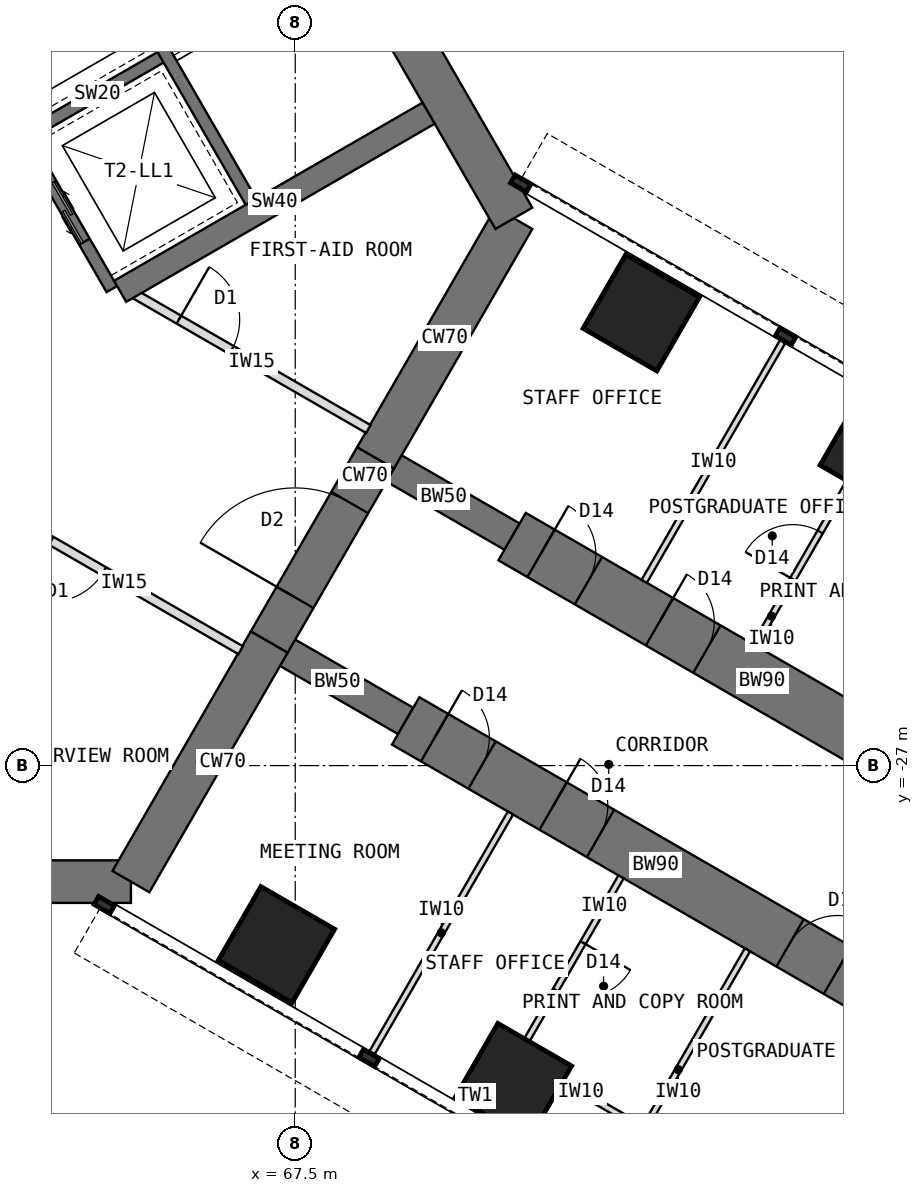
"""IFC4 building model, lengths in metres.
Left out: names, types, materials, properties, quantities, classifications, styles, units other than length and angle.
Written with IfcOpenShell. Run it as: python <this file> out.ifc"""

import sys

from ifc_helpers import new_model, si_unit, direction, frame, frame_2d, origin, origin_2d, place, context, subcontext, project, spatial, rectangle, extrude, element, fill, save


model = new_model("IFC4")
c1 = context("Model", 3, precision=1e-05, world=origin(), true_north=direction((0.0, 1.0)))
c2 = subcontext(c1, "Body", "Model", "MODEL_VIEW")
j1 = project(units=[si_unit("LENGTHUNIT", "METRE"), si_unit("PLANEANGLEUNIT", "RADIAN")], contexts=[c1])
p1 = place(None, origin())
s1 = spatial("IfcSite", under=j1, at=p1, CompositionType="ELEMENT")
p2 = place(p1, origin())
s2 = spatial("IfcBuilding", under=s1, at=p2, CompositionType="ELEMENT")
p3 = place(p2, frame((0.0, 0.0, 84.5)))
s3 = spatial("IfcBuildingStorey", under=s2, at=p3, CompositionType="ELEMENT", Elevation=84.5)
p4 = place(p3, frame((52.202, -28.908, 0.0), z_axis=(0.0, 0.0, 1.0), x_axis=(1.0, 0.0, 0.0)))
e1 = element("IfcWall", 1, at=p4, inside=s3, PredefinedType="SHEAR", context=c2, shape_type="SweptSolid", body=[
    extrude(rectangle(XDim=12.596, YDim=0.7, at=frame_2d((6.298, 0.0))), origin(), (0.0, 0.0, 1.0), 4.0),
])
p5 = place(p3, frame((64.798, -28.908, 0.0), z_axis=(0.0, 0.0, 1.0), x_axis=(0.499984222037, 0.866034513004, 0.0)))
e2 = element("IfcWall", 2, at=p5, inside=s3, PredefinedType="SHEAR", context=c2, shape_type="SweptSolid", body=[
    extrude(rectangle(XDim=4.548, YDim=0.7, at=frame_2d((2.274, 0.0))), origin(), (0.0, 0.0, 1.0), 4.0),
])
p6 = place(p3, frame((67.072, -24.97, 0.0), z_axis=(0.0, 0.0, 1.0), x_axis=(0.500010275428, 0.866019471182, 0.0)))
e3 = element("IfcWall", 3, at=p6, inside=s3, PredefinedType="SHEAR", context=c2, shape_type="SweptSolid", body=[
    extrude(rectangle(XDim=3.5, YDim=0.7, at=frame_2d((1.75, 0.0))), origin(), (0.0, 0.0, 1.0), 4.0),
])
p7 = place(p6, frame((0.85, 0.0, 0.0)))
e4 = element("IfcOpeningElement", 4, at=p7, cuts=e3, PredefinedType="OPENING", context=c2, shape_type="SweptSolid", body=[
    extrude(rectangle(XDim=1.8, YDim=2.1, at=frame_2d((0.9, 1.05))), frame((0.0, 0.36, 0.0), z_axis=(0.0, -1.0, 0.0), x_axis=(1.0, 0.0, 0.0)), (0.0, 0.0, 1.0), 0.72),
])
p8 = place(p3, frame((68.822, -21.939, 0.0), z_axis=(0.0, 0.0, 1.0), x_axis=(0.500024481964, 0.866011268655, 0.0)))
e5 = element("IfcWall", 5, at=p8, inside=s3, PredefinedType="SHEAR", context=c2, shape_type="SweptSolid", body=[
    extrude(rectangle(XDim=4.548, YDim=0.7, at=frame_2d((2.274, 0.0))), origin(), (0.0, 0.0, 1.0), 4.0),
])
p9 = place(p3, frame((71.096, -18.0, 0.0), z_axis=(0.0, 0.0, 1.0), x_axis=(-0.500005998175, 0.866021940709, 0.0)))
e6 = element("IfcWall", 6, at=p9, inside=s3, PredefinedType="SHEAR", context=c2, shape_type="SweptSolid", body=[
    extrude(rectangle(XDim=12.596, YDim=0.7, at=frame_2d((6.298, 0.0))), origin(), (0.0, 0.0, 1.0), 4.0),
])
p10 = place(p3, frame((68.822, -21.939, 0.0), z_axis=(0.0, 0.0, 1.0), x_axis=(0.866072649678, -0.499918158782, 0.0)))
e7 = element("IfcWall", 7, at=p10, inside=s3, PredefinedType="SHEAR", context=c2, shape_type="SweptSolid", body=[
    extrude(rectangle(XDim=2.592, YDim=0.5, at=frame_2d((1.296, 0.0))), origin(), (0.0, 0.0, 1.0), 4.0),
])
p11 = place(p3, frame((71.066, -23.234, 0.0), z_axis=(0.0, 0.0, 1.0), x_axis=(0.86602681393, -0.499997557548, 0.0)))
e8 = element("IfcWall", 8, at=p11, inside=s3, PredefinedType="SHEAR", context=c2, shape_type="SweptSolid", body=[
    extrude(rectangle(XDim=9.5, YDim=0.9, at=frame_2d((4.75, 0.0))), origin(), (0.0, 0.0, 1.0), 4.0),
])
p12 = place(p11, frame((0.55, 0.0, 0.0)))
e9 = element("IfcOpeningElement", 9, at=p12, cuts=e8, PredefinedType="OPENING", context=c2, shape_type="SweptSolid", body=[
    extrude(rectangle(XDim=0.9, YDim=2.1, at=frame_2d((0.45, 1.05))), frame((0.0, 0.46, 0.0), z_axis=(0.0, -1.0, 0.0), x_axis=(1.0, 0.0, 0.0)), (0.0, 0.0, 1.0), 0.92),
])
p13 = place(p11, frame((2.8, 0.0, 0.0)))
e10 = element("IfcOpeningElement", 10, at=p13, cuts=e8, PredefinedType="OPENING", context=c2, shape_type="SweptSolid", body=[
    extrude(rectangle(XDim=0.9, YDim=2.1, at=frame_2d((0.45, 1.05))), frame((0.0, 0.46, 0.0), z_axis=(0.0, -1.0, 0.0), x_axis=(1.0, 0.0, 0.0)), (0.0, 0.0, 1.0), 0.92),
])
p14 = place(p11, frame((7.3, 0.0, 0.0)))
e11 = element("IfcOpeningElement", 11, at=p14, cuts=e8, PredefinedType="OPENING", context=c2, shape_type="SweptSolid", body=[
    extrude(rectangle(XDim=0.9, YDim=2.1, at=frame_2d((0.45, 1.05))), frame((0.0, 0.46, 0.0), z_axis=(0.0, -1.0, 0.0), x_axis=(1.0, 0.0, 0.0)), (0.0, 0.0, 1.0), 0.92),
])
p15 = place(p3, frame((67.072, -24.97, 0.0), z_axis=(0.0, 0.0, 1.0), x_axis=(0.866031863473, -0.499988811324, 0.0)))
e12 = element("IfcWall", 12, at=p15, inside=s3, PredefinedType="SHEAR", context=c2, shape_type="SweptSolid", body=[
    extrude(rectangle(XDim=2.592, YDim=0.5, at=frame_2d((1.296, 0.0))), origin(), (0.0, 0.0, 1.0), 4.0),
])
p16 = place(p3, frame((69.316, -26.266, 0.0), z_axis=(0.0, 0.0, 1.0), x_axis=(0.86602681393, -0.499997557548, 0.0)))
e13 = element("IfcWall", 13, at=p16, inside=s3, PredefinedType="SHEAR", context=c2, shape_type="SweptSolid", body=[
    extrude(rectangle(XDim=9.5, YDim=0.9, at=frame_2d((4.75, 0.0))), origin(), (0.0, 0.0, 1.0), 4.0),
])
p17 = place(p16, frame((0.55, 0.0, 0.0)))
e14 = element("IfcOpeningElement", 14, at=p17, cuts=e13, PredefinedType="OPENING", context=c2, shape_type="SweptSolid", body=[
    extrude(rectangle(XDim=0.9, YDim=2.1, at=frame_2d((0.45, 1.05))), frame((0.0, 0.46, 0.0), z_axis=(0.0, -1.0, 0.0), x_axis=(1.0, 0.0, 0.0)), (0.0, 0.0, 1.0), 0.92),
])
p18 = place(p16, frame((2.8, 0.0, 0.0)))
e15 = element("IfcOpeningElement", 15, at=p18, cuts=e13, PredefinedType="OPENING", context=c2, shape_type="SweptSolid", body=[
    extrude(rectangle(XDim=0.9, YDim=2.1, at=frame_2d((0.45, 1.05))), frame((0.0, 0.46, 0.0), z_axis=(0.0, -1.0, 0.0), x_axis=(1.0, 0.0, 0.0)), (0.0, 0.0, 1.0), 0.92),
])
p19 = place(p16, frame((7.3, 0.0, 0.0)))
e16 = element("IfcOpeningElement", 16, at=p19, cuts=e13, PredefinedType="OPENING", context=c2, shape_type="SweptSolid", body=[
    extrude(rectangle(XDim=0.9, YDim=2.1, at=frame_2d((0.45, 1.05))), frame((0.0, 0.46, 0.0), z_axis=(0.0, -1.0, 0.0), x_axis=(1.0, 0.0, 0.0)), (0.0, 0.0, 1.0), 0.92),
])
for number, where, z_axis, x_axis in (
    (17, (73.191, -19.554, 0.0), (0.0, 0.0, 1.0), (0.5, 0.866, 0.0)),
    (18, (67.191, -29.946, 0.0), (0.0, 0.0, 1.0), (0.5, 0.866, 0.0)),
    (19, (77.088, -21.804, 0.0), (0.0, 0.0, 1.0), (0.5, 0.866, 0.0)),
    (20, (71.088, -32.196, 0.0), (0.0, 0.0, 1.0), (0.5, 0.866, 0.0)),
):
    element("IfcColumn", number, at=place(p3, frame(where, z_axis=z_axis, x_axis=x_axis)), inside=s3, PredefinedType="COLUMN", context=c2, shape_type="SweptSolid", body=[
        extrude(rectangle(XDim=1.4, YDim=1.4, at=origin_2d()), origin(), (0.0, 0.0, 1.0), 4.0),
    ])
p20 = place(p3, frame((64.484, -19.164, 0.0), z_axis=(0.0, 0.0, 1.0), x_axis=(-0.49999894854, 0.866026010844, 0.0)))
e21 = element("IfcWall", 21, at=p20, inside=s3, PredefinedType="SHEAR", context=c2, shape_type="SweptSolid", body=[
    extrude(rectangle(XDim=8.0, YDim=0.2, at=frame_2d((4.0, 0.0))), origin(), (0.0, 0.0, 1.0), 4.0),
])
p21 = place(p20, frame((6.3, 0.0, 0.0)))
e22 = element("IfcOpeningElement", 22, at=p21, cuts=e21, PredefinedType="OPENING", context=c2, shape_type="SweptSolid", body=[
    extrude(rectangle(XDim=1.2, YDim=2.1, at=frame_2d((0.6, 1.05))), frame((0.0, 0.11, 0.0), z_axis=(0.0, -1.0, 0.0), x_axis=(1.0, 0.0, 0.0)), (0.0, 0.0, 1.0), 0.22),
])
p22 = place(p20, frame((0.9, 0.0, 0.0)))
e23 = element("IfcOpeningElement", 23, at=p22, cuts=e21, PredefinedType="OPENING", context=c2, shape_type="SweptSolid", body=[
    extrude(rectangle(XDim=1.1, YDim=2.2, at=frame_2d((0.55, 1.1))), frame((0.0, 0.11, 0.0), z_axis=(0.0, -1.0, 0.0), x_axis=(1.0, 0.0, 0.0)), (0.0, 0.0, 1.0), 0.22),
])
p23 = place(p20, frame((3.8, 0.0, 0.0)))
e24 = element("IfcOpeningElement", 24, at=p23, cuts=e21, PredefinedType="OPENING", context=c2, shape_type="SweptSolid", body=[
    extrude(rectangle(XDim=1.1, YDim=2.2, at=frame_2d((0.55, 1.1))), frame((0.0, 0.11, 0.0), z_axis=(0.0, -1.0, 0.0), x_axis=(1.0, 0.0, 0.0)), (0.0, 0.0, 1.0), 0.22),
])
p24 = place(p3, frame((63.12, -16.603, 0.0), z_axis=(0.0, 0.0, 1.0), x_axis=(0.866062058628, 0.499936506574, 0.0)))
e25 = element("IfcWall", 25, at=p24, inside=s3, PredefinedType="SHEAR", context=c2, shape_type="SweptSolid", body=[
    extrude(rectangle(XDim=2.6, YDim=0.2, at=frame_2d((1.3, 0.0))), origin(), (0.0, 0.0, 1.0), 4.0),
])
p25 = place(p3, frame((66.822, -17.814, 0.0), z_axis=(0.0, 0.0, 1.0), x_axis=(-0.49999894854, 0.866026010844, 0.0)))
e26 = element("IfcWall", 26, at=p25, inside=s3, PredefinedType="SHEAR", context=c2, shape_type="SweptSolid", body=[
    extrude(rectangle(XDim=8.0, YDim=0.2, at=frame_2d((4.0, 0.0))), origin(), (0.0, 0.0, 1.0), 4.0),
])
p26 = place(p25, frame((6.7, 0.0, 0.0)))
e27 = element("IfcOpeningElement", 27, at=p26, cuts=e26, PredefinedType="OPENING", context=c2, shape_type="SweptSolid", body=[
    extrude(rectangle(XDim=1.1, YDim=2.1, at=frame_2d((0.55, 1.05))), frame((0.0, 0.11, 0.0), z_axis=(0.0, -1.0, 0.0), x_axis=(1.0, 0.0, 0.0)), (0.0, 0.0, 1.0), 0.22),
])
p27 = place(p3, frame((64.62, -19.201, 0.0), z_axis=(0.0, 0.0, 1.0), x_axis=(0.866023886965, 0.500002627198, 0.0)))
e28 = element("IfcWall", 28, at=p27, inside=s3, PredefinedType="SHEAR", context=c2, shape_type="SweptSolid", body=[
    extrude(rectangle(XDim=5.858, YDim=0.4, at=frame_2d((2.929, 0.0))), origin(), (0.0, 0.0, 1.0), 4.0),
])
p28 = place(p3, frame((73.24, -23.97, 0.0), z_axis=(0.0, 0.0, 1.0), x_axis=(0.499982560684, 0.866035472144, 0.0)))
e29 = element("IfcWall", 29, at=p28, inside=s3, PredefinedType="PARTITIONING", context=c2, shape_type="SweptSolid", body=[
    extrude(rectangle(XDim=4.55, YDim=0.1, at=frame_2d((2.275, 0.0))), origin(), (0.0, 0.0, 1.0), 3.8),
])
p29 = place(p3, frame((75.059, -25.02, 0.0), z_axis=(0.0, 0.0, 1.0), x_axis=(0.499977295307, 0.866038511948, 0.0)))
e30 = element("IfcWall", 30, at=p29, inside=s3, PredefinedType="PARTITIONING", context=c2, shape_type="SweptSolid", body=[
    extrude(rectangle(XDim=3.4, YDim=0.1, at=frame_2d((1.7, 0.0))), origin(), (0.0, 0.0, 1.0), 3.8),
])
p30 = place(p29, frame((1.25, 0.0, 0.0)))
e31 = element("IfcOpeningElement", 31, at=p30, cuts=e30, PredefinedType="OPENING", context=c2, shape_type="SweptSolid", body=[
    extrude(rectangle(XDim=0.9, YDim=2.1, at=frame_2d((0.45, 1.05))), frame((0.0, 0.06, 0.0), z_axis=(0.0, -1.0, 0.0), x_axis=(1.0, 0.0, 0.0)), (0.0, 0.0, 1.0), 0.12),
])
for number, where, z_axis, x_axis in (
    (32, (71.04, -27.78, 0.0), (0.0, 0.0, 1.0), (-0.5, -0.866, 0.0)),
    (33, (74.937, -30.03, 0.0), (0.0, 0.0, 1.0), (-0.5, -0.866, 0.0)),
):
    element("IfcWall", number, at=place(p3, frame(where, z_axis=z_axis, x_axis=x_axis)), inside=s3, PredefinedType="PARTITIONING", context=c2, shape_type="SweptSolid", body=[
        extrude(rectangle(XDim=4.55, YDim=0.1, at=frame_2d((2.275, 0.0))), origin(), (0.0, 0.0, 1.0), 3.8),
    ])
p31 = place(p3, frame((71.158, -31.775, 0.0), z_axis=(0.0, 0.0, 1.0), x_axis=(0.866006032174, -0.500033551112, 0.0)))
e34 = element("IfcWall", 34, at=p31, inside=s3, PredefinedType="PARTITIONING", context=c2, shape_type="SweptSolid", body=[
    extrude(rectangle(XDim=2.4, YDim=0.1, at=frame_2d((1.2, 0.0))), origin(), (0.0, 0.0, 1.0), 3.8),
])
p32 = place(p3, frame((72.859, -28.83, 0.0), z_axis=(0.0, 0.0, 1.0), x_axis=(-0.500062241894, -0.865989465428, 0.0)))
e35 = element("IfcWall", 35, at=p32, inside=s3, PredefinedType="PARTITIONING", context=c2, shape_type="SweptSolid", body=[
    extrude(rectangle(XDim=3.4, YDim=0.1, at=frame_2d((1.7, 0.0))), origin(), (0.0, 0.0, 1.0), 3.8),
])
p33 = place(p32, frame((1.25, 0.0, 0.0)))
e36 = element("IfcOpeningElement", 36, at=p33, cuts=e35, PredefinedType="OPENING", context=c2, shape_type="SweptSolid", body=[
    extrude(rectangle(XDim=0.9, YDim=2.1, at=frame_2d((0.45, 1.05))), frame((0.0, 0.06, 0.0), z_axis=(0.0, -1.0, 0.0), x_axis=(1.0, 0.0, 0.0)), (0.0, 0.0, 1.0), 0.12),
])
p34 = place(p3, frame((64.87, -19.253, 0.0), z_axis=(0.0, 0.0, 1.0), x_axis=(0.866021148949, -0.500007369519, 0.0)))
e37 = element("IfcWall", 37, at=p34, inside=s3, PredefinedType="PARTITIONING", context=c2, shape_type="SweptSolid", body=[
    extrude(rectangle(XDim=4.426, YDim=0.15, at=frame_2d((2.213, 0.0))), origin(), (0.0, 0.0, 1.0), 3.8),
])
p35 = place(p34, frame((0.828, 0.0, 0.0)))
e38 = element("IfcOpeningElement", 38, at=p35, cuts=e37, PredefinedType="OPENING", context=c2, shape_type="SweptSolid", body=[
    extrude(rectangle(XDim=1.0, YDim=2.1, at=frame_2d((0.5, 1.05))), frame((0.0, 0.085, 0.0), z_axis=(0.0, -1.0, 0.0), x_axis=(1.0, 0.0, 0.0)), (0.0, 0.0, 1.0), 0.17),
])
p36 = place(p3, frame((66.603, -25.103, 0.0), z_axis=(0.0, 0.0, 1.0), x_axis=(-0.866021148949, 0.500007369519, 0.0)))
e39 = element("IfcWall", 39, at=p36, inside=s3, PredefinedType="PARTITIONING", context=c2, shape_type="SweptSolid", body=[
    extrude(rectangle(XDim=4.426, YDim=0.15, at=frame_2d((2.213, 0.0))), origin(), (0.0, 0.0, 1.0), 3.8),
])
p37 = place(p36, frame((2.598, 0.0, 0.0)))
e40 = element("IfcOpeningElement", 40, at=p37, cuts=e39, PredefinedType="OPENING", context=c2, shape_type="SweptSolid", body=[
    extrude(rectangle(XDim=1.0, YDim=2.1, at=frame_2d((0.5, 1.05))), frame((0.0, 0.085, 0.0), z_axis=(0.0, -1.0, 0.0), x_axis=(1.0, 0.0, 0.0)), (0.0, 0.0, 1.0), 0.17),
])
p38 = place(p22, origin())
e41 = element("IfcDoor", 41, at=p38, inside=s3, OperationType="DOUBLE_DOOR_SLIDING", PredefinedType="DOOR", context=c2, shape_type="SweptSolid", body=[
    extrude(rectangle(XDim=1.1, YDim=2.2, at=frame_2d((0.55, 1.1))), frame((0.0, 0.025, 0.0), z_axis=(0.0, -1.0, 0.0), x_axis=(1.0, 0.0, 0.0)), (0.0, 0.0, 1.0), 0.05),
])
fill(e23, e41)
p39 = place(p7, origin())
e42 = element("IfcDoor", 42, at=p39, inside=s3, OperationType="DOUBLE_DOOR_DOUBLE_SWING", PredefinedType="DOOR", context=c2, shape_type="SweptSolid", body=[
    extrude(rectangle(XDim=1.72, YDim=2.06, at=frame_2d((0.9, 1.03))), frame((0.0, 0.025, 0.0), z_axis=(0.0, -1.0, 0.0), x_axis=(1.0, 0.0, 0.0)), (0.0, 0.0, 1.0), 0.05),
    extrude(rectangle(XDim=0.04, YDim=2.1, at=frame_2d((0.02, 1.05))), frame((0.0, 0.35, 0.0), z_axis=(0.0, -1.0, 0.0), x_axis=(1.0, 0.0, 0.0)), (0.0, 0.0, 1.0), 0.699),
    extrude(rectangle(XDim=0.04, YDim=2.1, at=frame_2d((1.78, 1.05))), frame((0.0, 0.35, 0.0), z_axis=(0.0, -1.0, 0.0), x_axis=(1.0, 0.0, 0.0)), (0.0, 0.0, 1.0), 0.699),
    extrude(rectangle(XDim=1.72, YDim=0.04, at=frame_2d((0.9, 2.08))), frame((0.0, 0.35, 0.0), z_axis=(0.0, -1.0, 0.0), x_axis=(1.0, 0.0, 0.0)), (0.0, 0.0, 1.0), 0.699),
])
fill(e4, e42)
p40 = place(p30, origin())
e43 = element("IfcDoor", 43, at=p40, inside=s3, OperationType="SINGLE_SWING_LEFT", PredefinedType="DOOR", context=c2, shape_type="SweptSolid", body=[
    extrude(rectangle(XDim=0.9, YDim=2.1, at=frame_2d((0.45, 1.05))), frame((0.0, 0.025, 0.0), z_axis=(0.0, -1.0, 0.0), x_axis=(1.0, 0.0, 0.0)), (0.0, 0.0, 1.0), 0.05),
])
fill(e31, e43)
p41 = place(p33, origin())
e44 = element("IfcDoor", 44, at=p41, inside=s3, OperationType="SINGLE_SWING_LEFT", PredefinedType="DOOR", context=c2, shape_type="SweptSolid", body=[
    extrude(rectangle(XDim=0.9, YDim=2.1, at=frame_2d((0.45, 1.05))), frame((0.0, 0.025, 0.0), z_axis=(0.0, -1.0, 0.0), x_axis=(1.0, 0.0, 0.0)), (0.0, 0.0, 1.0), 0.05),
])
fill(e36, e44)
p42 = place(p37, origin())
e45 = element("IfcDoor", 45, at=p42, inside=s3, OperationType="SINGLE_SWING_RIGHT", PredefinedType="DOOR", context=c2, shape_type="SweptSolid", body=[
    extrude(rectangle(XDim=1.0, YDim=2.1, at=frame_2d((0.5, 1.05))), frame((0.0, 0.025, 0.0), z_axis=(0.0, -1.0, 0.0), x_axis=(1.0, 0.0, 0.0)), (0.0, 0.0, 1.0), 0.05),
])
fill(e40, e45)
p43 = place(p35, origin())
e46 = element("IfcDoor", 46, at=p43, inside=s3, OperationType="SINGLE_SWING_LEFT", PredefinedType="DOOR", context=c2, shape_type="SweptSolid", body=[
    extrude(rectangle(XDim=1.0, YDim=2.1, at=frame_2d((0.5, 1.05))), frame((0.0, 0.025, 0.0), z_axis=(0.0, -1.0, 0.0), x_axis=(1.0, 0.0, 0.0)), (0.0, 0.0, 1.0), 0.05),
])
fill(e38, e46)
p44 = place(p12, origin())
e47 = element("IfcDoor", 47, at=p44, inside=s3, OperationType="SINGLE_SWING_LEFT", PredefinedType="DOOR", context=c2, shape_type="SweptSolid", body=[
    extrude(rectangle(XDim=0.82, YDim=2.06, at=frame_2d((0.45, 1.03))), frame((0.0, 0.025, 0.0), z_axis=(0.0, -1.0, 0.0), x_axis=(1.0, 0.0, 0.0)), (0.0, 0.0, 1.0), 0.05),
    extrude(rectangle(XDim=0.04, YDim=2.1, at=frame_2d((0.02, 1.05))), frame((0.0, 0.45, 0.0), z_axis=(0.0, -1.0, 0.0), x_axis=(1.0, 0.0, 0.0)), (0.0, 0.0, 1.0), 0.899),
    extrude(rectangle(XDim=0.04, YDim=2.1, at=frame_2d((0.88, 1.05))), frame((0.0, 0.45, 0.0), z_axis=(0.0, -1.0, 0.0), x_axis=(1.0, 0.0, 0.0)), (0.0, 0.0, 1.0), 0.899),
    extrude(rectangle(XDim=0.82, YDim=0.04, at=frame_2d((0.45, 2.08))), frame((0.0, 0.45, 0.0), z_axis=(0.0, -1.0, 0.0), x_axis=(1.0, 0.0, 0.0)), (0.0, 0.0, 1.0), 0.899),
])
fill(e9, e47)
p45 = place(p13, origin())
e48 = element("IfcDoor", 48, at=p45, inside=s3, OperationType="SINGLE_SWING_LEFT", PredefinedType="DOOR", context=c2, shape_type="SweptSolid", body=[
    extrude(rectangle(XDim=0.82, YDim=2.06, at=frame_2d((0.45, 1.03))), frame((0.0, 0.025, 0.0), z_axis=(0.0, -1.0, 0.0), x_axis=(1.0, 0.0, 0.0)), (0.0, 0.0, 1.0), 0.05),
    extrude(rectangle(XDim=0.04, YDim=2.1, at=frame_2d((0.02, 1.05))), frame((0.0, 0.45, 0.0), z_axis=(0.0, -1.0, 0.0), x_axis=(1.0, 0.0, 0.0)), (0.0, 0.0, 1.0), 0.899),
    extrude(rectangle(XDim=0.04, YDim=2.1, at=frame_2d((0.88, 1.05))), frame((0.0, 0.45, 0.0), z_axis=(0.0, -1.0, 0.0), x_axis=(1.0, 0.0, 0.0)), (0.0, 0.0, 1.0), 0.899),
    extrude(rectangle(XDim=0.82, YDim=0.04, at=frame_2d((0.45, 2.08))), frame((0.0, 0.45, 0.0), z_axis=(0.0, -1.0, 0.0), x_axis=(1.0, 0.0, 0.0)), (0.0, 0.0, 1.0), 0.899),
])
fill(e10, e48)
p46 = place(p17, origin())
e49 = element("IfcDoor", 49, at=p46, inside=s3, OperationType="SINGLE_SWING_LEFT", PredefinedType="DOOR", context=c2, shape_type="SweptSolid", body=[
    extrude(rectangle(XDim=0.82, YDim=2.06, at=frame_2d((0.45, 1.03))), frame((0.0, 0.025, 0.0), z_axis=(0.0, -1.0, 0.0), x_axis=(1.0, 0.0, 0.0)), (0.0, 0.0, 1.0), 0.05),
    extrude(rectangle(XDim=0.04, YDim=2.1, at=frame_2d((0.02, 1.05))), frame((0.0, 0.45, 0.0), z_axis=(0.0, -1.0, 0.0), x_axis=(1.0, 0.0, 0.0)), (0.0, 0.0, 1.0), 0.899),
    extrude(rectangle(XDim=0.04, YDim=2.1, at=frame_2d((0.88, 1.05))), frame((0.0, 0.45, 0.0), z_axis=(0.0, -1.0, 0.0), x_axis=(1.0, 0.0, 0.0)), (0.0, 0.0, 1.0), 0.899),
    extrude(rectangle(XDim=0.82, YDim=0.04, at=frame_2d((0.45, 2.08))), frame((0.0, 0.45, 0.0), z_axis=(0.0, -1.0, 0.0), x_axis=(1.0, 0.0, 0.0)), (0.0, 0.0, 1.0), 0.899),
])
fill(e14, e49)
p47 = place(p18, origin())
e50 = element("IfcDoor", 50, at=p47, inside=s3, OperationType="SINGLE_SWING_LEFT", PredefinedType="DOOR", context=c2, shape_type="SweptSolid", body=[
    extrude(rectangle(XDim=0.82, YDim=2.06, at=frame_2d((0.45, 1.03))), frame((0.0, 0.025, 0.0), z_axis=(0.0, -1.0, 0.0), x_axis=(1.0, 0.0, 0.0)), (0.0, 0.0, 1.0), 0.05),
    extrude(rectangle(XDim=0.04, YDim=2.1, at=frame_2d((0.02, 1.05))), frame((0.0, 0.45, 0.0), z_axis=(0.0, -1.0, 0.0), x_axis=(1.0, 0.0, 0.0)), (0.0, 0.0, 1.0), 0.899),
    extrude(rectangle(XDim=0.04, YDim=2.1, at=frame_2d((0.88, 1.05))), frame((0.0, 0.45, 0.0), z_axis=(0.0, -1.0, 0.0), x_axis=(1.0, 0.0, 0.0)), (0.0, 0.0, 1.0), 0.899),
    extrude(rectangle(XDim=0.82, YDim=0.04, at=frame_2d((0.45, 2.08))), frame((0.0, 0.45, 0.0), z_axis=(0.0, -1.0, 0.0), x_axis=(1.0, 0.0, 0.0)), (0.0, 0.0, 1.0), 0.899),
])
fill(e15, e50)
p48 = place(p19, origin())
e51 = element("IfcDoor", 51, at=p48, inside=s3, OperationType="SINGLE_SWING_RIGHT", PredefinedType="DOOR", context=c2, shape_type="SweptSolid", body=[
    extrude(rectangle(XDim=0.82, YDim=2.06, at=frame_2d((0.45, 1.03))), frame((0.0, 0.025, 0.0), z_axis=(0.0, -1.0, 0.0), x_axis=(1.0, 0.0, 0.0)), (0.0, 0.0, 1.0), 0.05),
    extrude(rectangle(XDim=0.04, YDim=2.1, at=frame_2d((0.02, 1.05))), frame((0.0, 0.45, 0.0), z_axis=(0.0, -1.0, 0.0), x_axis=(1.0, 0.0, 0.0)), (0.0, 0.0, 1.0), 0.899),
    extrude(rectangle(XDim=0.04, YDim=2.1, at=frame_2d((0.88, 1.05))), frame((0.0, 0.45, 0.0), z_axis=(0.0, -1.0, 0.0), x_axis=(1.0, 0.0, 0.0)), (0.0, 0.0, 1.0), 0.899),
    extrude(rectangle(XDim=0.82, YDim=0.04, at=frame_2d((0.45, 2.08))), frame((0.0, 0.45, 0.0), z_axis=(0.0, -1.0, 0.0), x_axis=(1.0, 0.0, 0.0)), (0.0, 0.0, 1.0), 0.899),
])
fill(e16, e51)
save(model, sys.argv[1])
